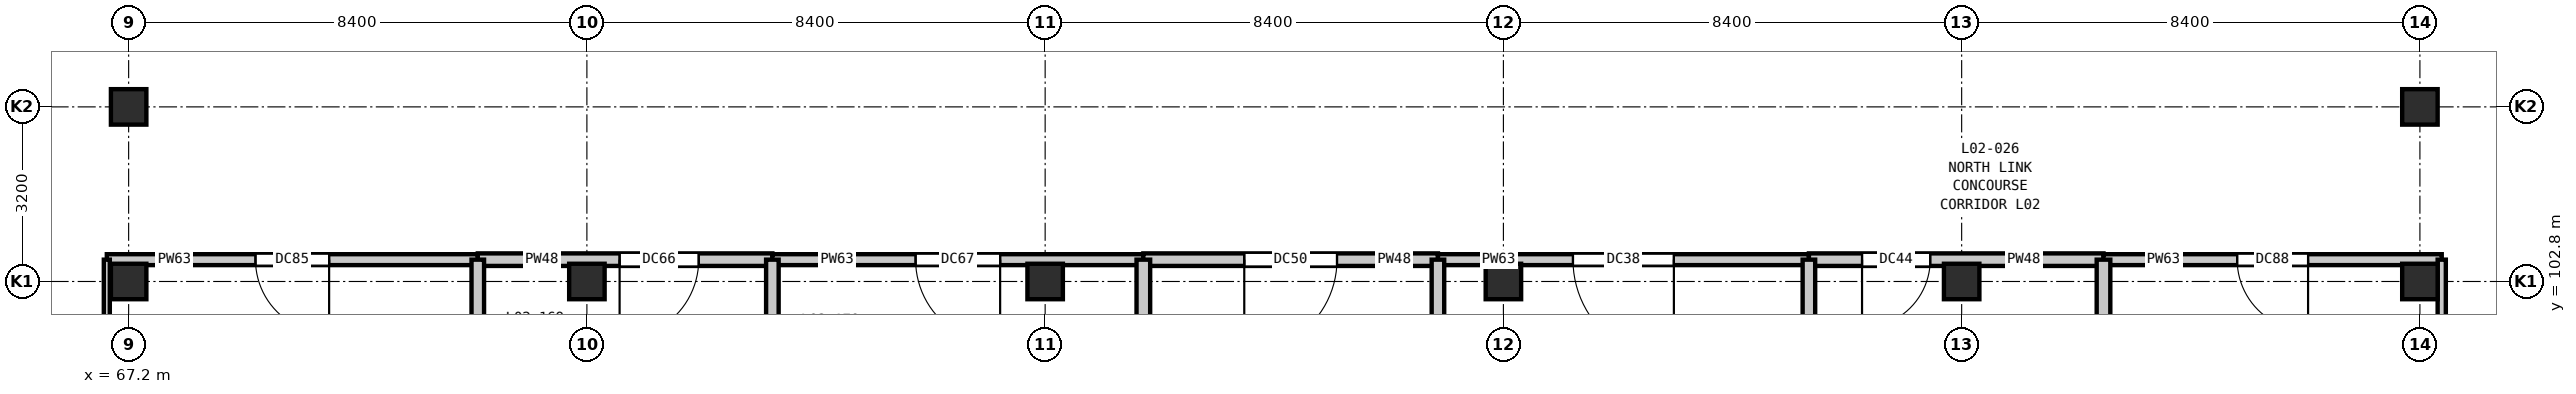
"""IFC4 building model, lengths in metres.
Left out: names, types, materials, properties, quantities, classifications, styles, units other than length and angle.
Written with IfcOpenShell. Run it as: python <this file> out.ifc"""

import sys

from ifc_helpers import new_model, si_unit, direction, frame, frame_2d, origin, origin_2d, place, context, subcontext, project, spatial, rectangle, extrude, element, fill, save


model = new_model("IFC4")
c1 = context("Model", 3, precision=1e-05, world=origin(), true_north=direction((0.0, 1.0)))
c2 = subcontext(c1, "Body", "Model", "MODEL_VIEW")
j1 = project(units=[si_unit("LENGTHUNIT", "METRE"), si_unit("PLANEANGLEUNIT", "RADIAN")], contexts=[c1])
p1 = place(None, origin())
s1 = spatial("IfcSite", under=j1, at=p1, CompositionType="ELEMENT")
p2 = place(p1, origin())
s2 = spatial("IfcBuilding", under=s1, at=p2, CompositionType="ELEMENT")
p3 = place(p2, frame((0.0, 0.0, 10.8)))
s3 = spatial("IfcBuildingStorey", under=s2, at=p3, CompositionType="ELEMENT", Elevation=10.8)
for number, where, z_axis, x_axis in (
    (1, (67.2, 102.8, 0.0), (0.0, 0.0, 1.0), (1.0, 0.0, 0.0)),
    (2, (67.2, 106.0, 0.0), (0.0, 0.0, 1.0), (1.0, 0.0, 0.0)),
    (3, (75.6, 102.8, 0.0), (0.0, 0.0, 1.0), (1.0, 0.0, 0.0)),
    (4, (84.0, 102.8, 0.0), (0.0, 0.0, 1.0), (1.0, 0.0, 0.0)),
    (5, (92.4, 102.8, 0.0), (0.0, 0.0, 1.0), (1.0, 0.0, 0.0)),
    (6, (100.8, 102.8, 0.0), (0.0, 0.0, 1.0), (1.0, 0.0, 0.0)),
    (7, (109.2, 102.8, 0.0), (0.0, 0.0, 1.0), (1.0, 0.0, 0.0)),
    (8, (109.2, 106.0, 0.0), (0.0, 0.0, 1.0), (1.0, 0.0, 0.0)),
):
    element("IfcColumn", number, at=place(p3, frame(where, z_axis=z_axis, x_axis=x_axis)), inside=s3, PredefinedType="COLUMN", context=c2, shape_type="SweptSolid", body=[
        extrude(rectangle(XDim=0.65, YDim=0.65, at=origin_2d()), origin(), (0.0, 0.0, 1.0), 5.4),
    ])
p4 = place(p3, frame((66.8, 103.2, 0.0), z_axis=(0.0, 0.0, 1.0), x_axis=(1.0, 0.0, 0.0)))
e9 = element("IfcWall", 9, at=p4, inside=s3, PredefinedType="PARTITIONING", context=c2, shape_type="SweptSolid", body=[
    extrude(rectangle(XDim=6.8, YDim=0.2, at=frame_2d((3.4, 0.0))), origin(), (0.0, 0.0, 1.0), 5.07),
])
p5 = place(p4, frame((2.725, 0.0, 0.0)))
e10 = element("IfcOpeningElement", 10, at=p5, cuts=e9, PredefinedType="OPENING", context=c2, shape_type="SweptSolid", body=[
    extrude(rectangle(XDim=1.35, YDim=2.2, at=frame_2d((0.675, 1.1))), frame((0.0, 0.11, 0.0), z_axis=(0.0, -1.0, 0.0), x_axis=(1.0, 0.0, 0.0)), (0.0, 0.0, 1.0), 0.22),
])
p6 = place(p3, frame((73.6, 103.2, 0.0), z_axis=(0.0, 0.0, 1.0), x_axis=(1.0, 0.0, 0.0)))
e11 = element("IfcWall", 11, at=p6, inside=s3, PredefinedType="PARTITIONING", context=c2, shape_type="SweptSolid", body=[
    extrude(rectangle(XDim=5.4, YDim=0.23, at=frame_2d((2.7, 0.0))), origin(), (0.0, 0.0, 1.0), 5.07),
])
p7 = place(p6, frame((2.6, 0.0, 0.0)))
e12 = element("IfcOpeningElement", 12, at=p7, cuts=e11, PredefinedType="OPENING", context=c2, shape_type="SweptSolid", body=[
    extrude(rectangle(XDim=1.45, YDim=2.25, at=frame_2d((0.725, 1.125))), frame((0.0, 0.125, 0.0), z_axis=(0.0, -1.0, 0.0), x_axis=(1.0, 0.0, 0.0)), (0.0, 0.0, 1.0), 0.25),
])
p8 = place(p3, frame((79.0, 103.2, 0.0), z_axis=(0.0, 0.0, 1.0), x_axis=(1.0, 0.0, 0.0)))
e13 = element("IfcWall", 13, at=p8, inside=s3, PredefinedType="PARTITIONING", context=c2, shape_type="SweptSolid", body=[
    extrude(rectangle(XDim=6.8, YDim=0.2, at=frame_2d((3.4, 0.0))), origin(), (0.0, 0.0, 1.0), 5.07),
])
p9 = place(p8, frame((2.625, 0.0, 0.0)))
e14 = element("IfcOpeningElement", 14, at=p9, cuts=e13, PredefinedType="OPENING", context=c2, shape_type="SweptSolid", body=[
    extrude(rectangle(XDim=1.55, YDim=2.25, at=frame_2d((0.775, 1.125))), frame((0.0, 0.11, 0.0), z_axis=(0.0, -1.0, 0.0), x_axis=(1.0, 0.0, 0.0)), (0.0, 0.0, 1.0), 0.22),
])
p10 = place(p3, frame((85.8, 103.2, 0.0), z_axis=(0.0, 0.0, 1.0), x_axis=(1.0, 0.0, 0.0)))
e15 = element("IfcWall", 15, at=p10, inside=s3, PredefinedType="PARTITIONING", context=c2, shape_type="SweptSolid", body=[
    extrude(rectangle(XDim=5.4, YDim=0.23, at=frame_2d((2.7, 0.0))), origin(), (0.0, 0.0, 1.0), 5.07),
])
p11 = place(p10, frame((1.85, 0.0, 0.0)))
e16 = element("IfcOpeningElement", 16, at=p11, cuts=e15, PredefinedType="OPENING", context=c2, shape_type="SweptSolid", body=[
    extrude(rectangle(XDim=1.7, YDim=2.3, at=frame_2d((0.85, 1.15))), frame((0.0, 0.125, 0.0), z_axis=(0.0, -1.0, 0.0), x_axis=(1.0, 0.0, 0.0)), (0.0, 0.0, 1.0), 0.25),
])
p12 = place(p3, frame((91.2, 103.2, 0.0), z_axis=(0.0, 0.0, 1.0), x_axis=(1.0, 0.0, 0.0)))
e17 = element("IfcWall", 17, at=p12, inside=s3, PredefinedType="PARTITIONING", context=c2, shape_type="SweptSolid", body=[
    extrude(rectangle(XDim=6.8, YDim=0.2, at=frame_2d((3.4, 0.0))), origin(), (0.0, 0.0, 1.0), 5.07),
])
p13 = place(p12, frame((2.475, 0.0, 0.0)))
e18 = element("IfcOpeningElement", 18, at=p13, cuts=e17, PredefinedType="OPENING", context=c2, shape_type="SweptSolid", body=[
    extrude(rectangle(XDim=1.85, YDim=2.3, at=frame_2d((0.925, 1.15))), frame((0.0, 0.11, 0.0), z_axis=(0.0, -1.0, 0.0), x_axis=(1.0, 0.0, 0.0)), (0.0, 0.0, 1.0), 0.22),
])
p14 = place(p3, frame((98.0, 103.2, 0.0), z_axis=(0.0, 0.0, 1.0), x_axis=(1.0, 0.0, 0.0)))
e19 = element("IfcWall", 19, at=p14, inside=s3, PredefinedType="PARTITIONING", context=c2, shape_type="SweptSolid", body=[
    extrude(rectangle(XDim=5.4, YDim=0.23, at=frame_2d((2.7, 0.0))), origin(), (0.0, 0.0, 1.0), 5.07),
])
p15 = place(p14, frame((0.974, 0.0, 0.0)))
e20 = element("IfcOpeningElement", 20, at=p15, cuts=e19, PredefinedType="OPENING", context=c2, shape_type="SweptSolid", body=[
    extrude(rectangle(XDim=1.25, YDim=2.15, at=frame_2d((0.625, 1.075))), frame((0.0, 0.125, 0.0), z_axis=(0.0, -1.0, 0.0), x_axis=(1.0, 0.0, 0.0)), (0.0, 0.0, 1.0), 0.25),
])
p16 = place(p3, frame((103.4, 103.2, 0.0), z_axis=(0.0, 0.0, 1.0), x_axis=(1.0, 0.0, 0.0)))
e21 = element("IfcWall", 21, at=p16, inside=s3, PredefinedType="PARTITIONING", context=c2, shape_type="SweptSolid", body=[
    extrude(rectangle(XDim=6.2, YDim=0.2, at=frame_2d((3.1, 0.0))), origin(), (0.0, 0.0, 1.0), 5.07),
])
p17 = place(p16, frame((2.45, 0.0, 0.0)))
e22 = element("IfcOpeningElement", 22, at=p17, cuts=e21, PredefinedType="OPENING", context=c2, shape_type="SweptSolid", body=[
    extrude(rectangle(XDim=1.3, YDim=2.2, at=frame_2d((0.65, 1.1))), frame((0.0, 0.11, 0.0), z_axis=(0.0, -1.0, 0.0), x_axis=(1.0, 0.0, 0.0)), (0.0, 0.0, 1.0), 0.22),
])
p18 = place(p3, frame((66.8, 99.6, 0.0), z_axis=(0.0, 0.0, 1.0), x_axis=(0.0, 1.0, 0.0)))
e23 = element("IfcWall", 23, at=p18, inside=s3, PredefinedType="PARTITIONING", context=c2, shape_type="SweptSolid", body=[
    extrude(rectangle(XDim=3.6, YDim=0.11, at=frame_2d((1.8, 0.0))), origin(), (0.0, 0.0, 1.0), 5.07),
])
for number, where, z_axis, x_axis in (
    (24, (73.6, 99.6, 0.0), (0.0, 0.0, 1.0), (0.0, 1.0, 0.0)),
    (25, (79.0, 99.6, 0.0), (0.0, 0.0, 1.0), (0.0, 1.0, 0.0)),
):
    element("IfcWall", number, at=place(p3, frame(where, z_axis=z_axis, x_axis=x_axis)), inside=s3, PredefinedType="PARTITIONING", context=c2, shape_type="SweptSolid", body=[
        extrude(rectangle(XDim=3.6, YDim=0.23, at=frame_2d((1.8, 0.0))), origin(), (0.0, 0.0, 1.0), 5.07),
    ])
p19 = place(p3, frame((85.8, 99.6, 0.0), z_axis=(0.0, 0.0, 1.0), x_axis=(0.0, 1.0, 0.0)))
e26 = element("IfcWall", 26, at=p19, inside=s3, PredefinedType="PARTITIONING", context=c2, shape_type="SweptSolid", body=[
    extrude(rectangle(XDim=3.6, YDim=0.25, at=frame_2d((1.8, 0.0))), origin(), (0.0, 0.0, 1.0), 5.07),
])
for number, where, z_axis, x_axis in (
    (27, (91.2, 99.6, 0.0), (0.0, 0.0, 1.0), (0.0, 1.0, 0.0)),
    (28, (98.0, 99.6, 0.0), (0.0, 0.0, 1.0), (0.0, 1.0, 0.0)),
):
    element("IfcWall", number, at=place(p3, frame(where, z_axis=z_axis, x_axis=x_axis)), inside=s3, PredefinedType="PARTITIONING", context=c2, shape_type="SweptSolid", body=[
        extrude(rectangle(XDim=3.6, YDim=0.23, at=frame_2d((1.8, 0.0))), origin(), (0.0, 0.0, 1.0), 5.07),
    ])
p20 = place(p3, frame((103.4, 99.6, 0.0), z_axis=(0.0, 0.0, 1.0), x_axis=(0.0, 1.0, 0.0)))
e29 = element("IfcWall", 29, at=p20, inside=s3, PredefinedType="PARTITIONING", context=c2, shape_type="SweptSolid", body=[
    extrude(rectangle(XDim=3.6, YDim=0.25, at=frame_2d((1.8, 0.0))), origin(), (0.0, 0.0, 1.0), 5.07),
])
p21 = place(p3, frame((109.6, 99.6, 0.0), z_axis=(0.0, 0.0, 1.0), x_axis=(0.0, 1.0, 0.0)))
e30 = element("IfcWall", 30, at=p21, inside=s3, PredefinedType="PARTITIONING", context=c2, shape_type="SweptSolid", body=[
    extrude(rectangle(XDim=3.6, YDim=0.15, at=frame_2d((1.8, 0.0))), origin(), (0.0, 0.0, 1.0), 5.07),
])
p22 = place(p5, frame((1.35, 0.0, 0.0), z_axis=(0.0, 0.0, 1.0), x_axis=(-1.0, 0.0, 0.0)))
e31 = element("IfcDoor", 31, at=p22, inside=s3, OperationType="SINGLE_SWING_LEFT", PredefinedType="DOOR", context=c2, shape_type="SweptSolid", body=[
    extrude(rectangle(XDim=1.35, YDim=2.2, at=frame_2d((0.675, 1.1))), frame((0.0, 0.025, 0.0), z_axis=(0.0, -1.0, 0.0), x_axis=(1.0, 0.0, 0.0)), (0.0, 0.0, 1.0), 0.05),
])
fill(e10, e31)
p23 = place(p7, frame((1.45, 0.0, 0.0), z_axis=(0.0, 0.0, 1.0), x_axis=(-1.0, 0.0, 0.0)))
e32 = element("IfcDoor", 32, at=p23, inside=s3, OperationType="SINGLE_SWING_RIGHT", PredefinedType="DOOR", context=c2, shape_type="SweptSolid", body=[
    extrude(rectangle(XDim=1.45, YDim=2.25, at=frame_2d((0.725, 1.125))), frame((0.0, 0.025, 0.0), z_axis=(0.0, -1.0, 0.0), x_axis=(1.0, 0.0, 0.0)), (0.0, 0.0, 1.0), 0.05),
])
fill(e12, e32)
p24 = place(p9, frame((1.55, 0.0, 0.0), z_axis=(0.0, 0.0, 1.0), x_axis=(-1.0, 0.0, 0.0)))
e33 = element("IfcDoor", 33, at=p24, inside=s3, OperationType="SINGLE_SWING_LEFT", PredefinedType="DOOR", context=c2, shape_type="SweptSolid", body=[
    extrude(rectangle(XDim=1.55, YDim=2.25, at=frame_2d((0.775, 1.125))), frame((0.0, 0.025, 0.0), z_axis=(0.0, -1.0, 0.0), x_axis=(1.0, 0.0, 0.0)), (0.0, 0.0, 1.0), 0.05),
])
fill(e14, e33)
p25 = place(p11, frame((1.7, 0.0, 0.0), z_axis=(0.0, 0.0, 1.0), x_axis=(-1.0, 0.0, 0.0)))
e34 = element("IfcDoor", 34, at=p25, inside=s3, OperationType="SINGLE_SWING_RIGHT", PredefinedType="DOOR", context=c2, shape_type="SweptSolid", body=[
    extrude(rectangle(XDim=1.7, YDim=2.3, at=frame_2d((0.85, 1.15))), frame((0.0, 0.025, 0.0), z_axis=(0.0, -1.0, 0.0), x_axis=(1.0, 0.0, 0.0)), (0.0, 0.0, 1.0), 0.05),
])
fill(e16, e34)
p26 = place(p13, frame((1.85, 0.0, 0.0), z_axis=(0.0, 0.0, 1.0), x_axis=(-1.0, 0.0, 0.0)))
e35 = element("IfcDoor", 35, at=p26, inside=s3, OperationType="SINGLE_SWING_LEFT", PredefinedType="DOOR", context=c2, shape_type="SweptSolid", body=[
    extrude(rectangle(XDim=1.85, YDim=2.3, at=frame_2d((0.925, 1.15))), frame((0.0, 0.025, 0.0), z_axis=(0.0, -1.0, 0.0), x_axis=(1.0, 0.0, 0.0)), (0.0, 0.0, 1.0), 0.05),
])
fill(e18, e35)
p27 = place(p15, frame((1.25, 0.0, 0.0), z_axis=(0.0, 0.0, 1.0), x_axis=(-1.0, 0.0, 0.0)))
e36 = element("IfcDoor", 36, at=p27, inside=s3, OperationType="SINGLE_SWING_RIGHT", PredefinedType="DOOR", context=c2, shape_type="SweptSolid", body=[
    extrude(rectangle(XDim=1.25, YDim=2.15, at=frame_2d((0.625, 1.075))), frame((0.0, 0.025, 0.0), z_axis=(0.0, -1.0, 0.0), x_axis=(1.0, 0.0, 0.0)), (0.0, 0.0, 1.0), 0.05),
])
fill(e20, e36)
p28 = place(p17, frame((1.3, 0.0, 0.0), z_axis=(0.0, 0.0, 1.0), x_axis=(-1.0, 0.0, 0.0)))
e37 = element("IfcDoor", 37, at=p28, inside=s3, OperationType="SINGLE_SWING_LEFT", PredefinedType="DOOR", context=c2, shape_type="SweptSolid", body=[
    extrude(rectangle(XDim=1.3, YDim=2.2, at=frame_2d((0.65, 1.1))), frame((0.0, 0.025, 0.0), z_axis=(0.0, -1.0, 0.0), x_axis=(1.0, 0.0, 0.0)), (0.0, 0.0, 1.0), 0.05),
])
fill(e22, e37)
save(model, sys.argv[1])
